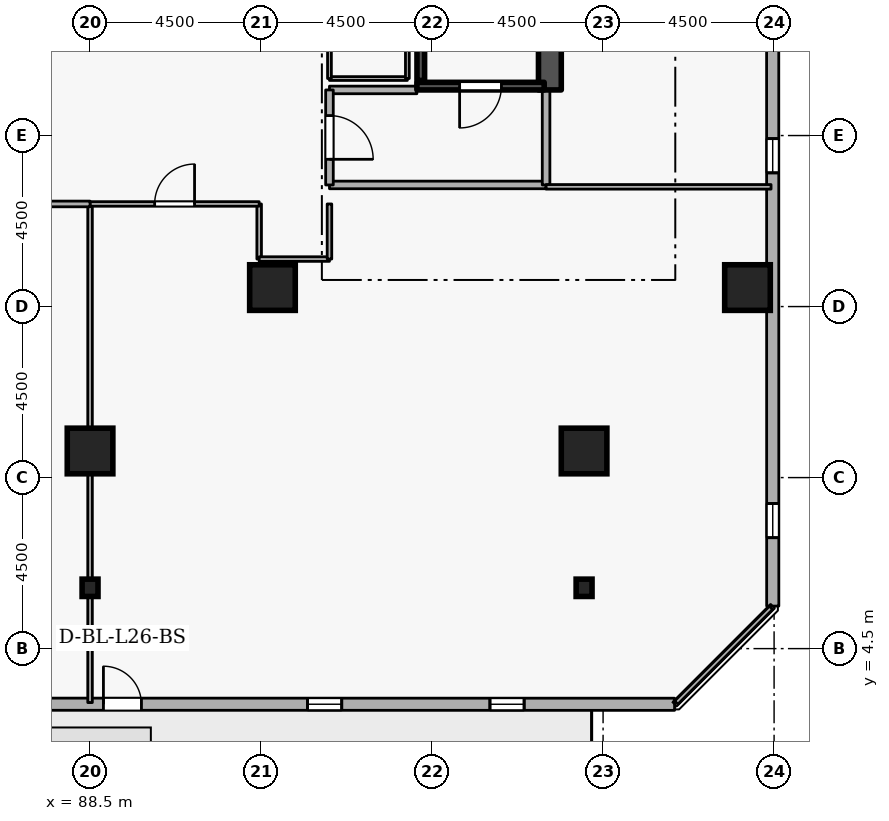
"""IFC4 building model, lengths in metres.
Left out: names, types, materials, properties, quantities, classifications, styles, units other than length and angle.
Written with IfcOpenShell. Run it as: python <this file> out.ifc"""

import sys

from ifc_helpers import new_model, si_unit, direction, frame, frame_2d, origin, origin_2d, place, context, subcontext, project, spatial, rectangle, i_section, extrude, element, fill, save


model = new_model("IFC4")
c1 = context("Model", 3, precision=1e-05, world=origin(), true_north=direction((0.0, 1.0)))
c2 = subcontext(c1, "Body", "Model", "MODEL_VIEW")
j1 = project(units=[si_unit("LENGTHUNIT", "METRE"), si_unit("PLANEANGLEUNIT", "RADIAN")], contexts=[c1])
p1 = place(None, origin())
s1 = spatial("IfcSite", under=j1, at=p1, CompositionType="ELEMENT")
p2 = place(p1, origin())
s2 = spatial("IfcBuilding", under=s1, at=p2, CompositionType="ELEMENT")
p3 = place(p2, frame((0.0, 0.0, 101.7)))
s3 = spatial("IfcBuildingStorey", under=s2, at=p3, CompositionType="ELEMENT", Elevation=101.7)
p4 = place(p3, frame((100.6, 19.2, 0.0), z_axis=(0.0, 0.0, 1.0), x_axis=(0.0, 1.0, 0.0)))
e1 = element("IfcWall", 1, at=p4, inside=s3, PredefinedType="SHEAR", context=c2, shape_type="SweptSolid", body=[
    extrude(rectangle(XDim=15.6, YDim=0.6, at=frame_2d((7.8, 0.0))), origin(), (0.0, 0.0, 1.0), 3.6),
])
for number, where, z_axis, x_axis in (
    (2, (105.8, 14.0, 0.0), (0.0, 0.0, 1.0), (1.0, 0.0, 0.0)),
    (3, (101.5, 9.7, 0.0), (0.0, 0.0, 1.0), (1.0, 0.0, 0.0)),
    (4, (88.5, 9.7, 0.0), (0.0, 0.0, 1.0), (1.0, 0.0, 0.0)),
    (5, (93.3, 14.0, 0.0), (0.0, 0.0, 1.0), (1.0, 0.0, 0.0)),
):
    element("IfcColumn", number, at=place(p3, frame(where, z_axis=z_axis, x_axis=x_axis)), inside=s3, PredefinedType="COLUMN", context=c2, shape_type="SweptSolid", body=[
        extrude(rectangle(XDim=1.2, YDim=1.2, at=origin_2d()), origin(), (0.0, 0.0, 1.0), 3.6),
    ])
for number, where, z_axis, x_axis in (
    (6, (101.5, 6.1, 0.0), (0.0, 0.0, 1.0), (1.0, 0.0, 0.0)),
    (7, (88.5, 6.1, 0.0), (0.0, 0.0, 1.0), (1.0, 0.0, 0.0)),
):
    element("IfcColumn", number, at=place(p3, frame(where, z_axis=z_axis, x_axis=x_axis)), inside=s3, PredefinedType="COLUMN", context=c2, shape_type="SweptSolid", body=[
        extrude(i_section(OverallWidth=0.418, OverallDepth=0.456, WebThickness=0.042, FlangeThickness=0.067, FilletRadius=0.015, at=origin_2d()), origin(), (0.0, 0.0, 1.0), 3.6),
    ])
p5 = place(p3, frame((68.423, 3.04, 0.0), z_axis=(0.0, 0.0, 1.0), x_axis=(0.99999999315, -0.00011704845, 0.0)))
e8 = element("IfcWall", 8, at=p5, inside=s3, PredefinedType="STANDARD", context=c2, shape_type="SweptSolid", body=[
    extrude(rectangle(XDim=35.459, YDim=0.32, at=frame_2d((17.729, 0.0))), origin(), (0.0, 0.0, 1.0), 2.7),
])
p6 = place(p5, frame((20.429, 0.0, 0.0)))
e9 = element("IfcOpeningElement", 9, at=p6, cuts=e8, PredefinedType="OPENING", context=c2, shape_type="SweptSolid", body=[
    extrude(rectangle(XDim=1.0, YDim=2.08, at=frame_2d((0.5, 1.04))), frame((0.0, 0.17, 0.0), z_axis=(0.0, -1.0, 0.0), x_axis=(1.0, 0.0, 0.0)), (0.0, 0.0, 1.0), 0.34),
])
p7 = place(p5, frame((1.8, 0.0, 0.72)))
e10 = element("IfcOpeningElement", 10, at=p7, cuts=e8, PredefinedType="OPENING", context=c2, shape_type="SweptSolid", body=[
    extrude(rectangle(XDim=0.9, YDim=1.75, at=frame_2d((0.45, 0.875))), frame((0.0, 0.17, 0.0), z_axis=(0.0, -1.0, 0.0), x_axis=(1.0, 0.0, 0.0)), (0.0, 0.0, 1.0), 0.34),
])
p8 = place(p5, frame((6.6, 0.0, 0.72)))
e11 = element("IfcOpeningElement", 11, at=p8, cuts=e8, PredefinedType="OPENING", context=c2, shape_type="SweptSolid", body=[
    extrude(rectangle(XDim=0.9, YDim=1.75, at=frame_2d((0.45, 0.875))), frame((0.0, 0.17, 0.0), z_axis=(0.0, -1.0, 0.0), x_axis=(1.0, 0.0, 0.0)), (0.0, 0.0, 1.0), 0.34),
])
p9 = place(p5, frame((11.4, 0.0, 0.72)))
e12 = element("IfcOpeningElement", 12, at=p9, cuts=e8, PredefinedType="OPENING", context=c2, shape_type="SweptSolid", body=[
    extrude(rectangle(XDim=0.9, YDim=1.75, at=frame_2d((0.45, 0.875))), frame((0.0, 0.17, 0.0), z_axis=(0.0, -1.0, 0.0), x_axis=(1.0, 0.0, 0.0)), (0.0, 0.0, 1.0), 0.34),
])
p10 = place(p5, frame((16.2, 0.0, 0.72)))
e13 = element("IfcOpeningElement", 13, at=p10, cuts=e8, PredefinedType="OPENING", context=c2, shape_type="SweptSolid", body=[
    extrude(rectangle(XDim=0.9, YDim=1.75, at=frame_2d((0.45, 0.875))), frame((0.0, 0.17, 0.0), z_axis=(0.0, -1.0, 0.0), x_axis=(1.0, 0.0, 0.0)), (0.0, 0.0, 1.0), 0.34),
])
p11 = place(p5, frame((25.8, 0.0, 0.72)))
e14 = element("IfcOpeningElement", 14, at=p11, cuts=e8, PredefinedType="OPENING", context=c2, shape_type="SweptSolid", body=[
    extrude(rectangle(XDim=0.9, YDim=1.75, at=frame_2d((0.45, 0.875))), frame((0.0, 0.17, 0.0), z_axis=(0.0, -1.0, 0.0), x_axis=(1.0, 0.0, 0.0)), (0.0, 0.0, 1.0), 0.34),
])
p12 = place(p5, frame((30.6, 0.0, 0.72)))
e15 = element("IfcOpeningElement", 15, at=p12, cuts=e8, PredefinedType="OPENING", context=c2, shape_type="SweptSolid", body=[
    extrude(rectangle(XDim=0.9, YDim=1.75, at=frame_2d((0.45, 0.875))), frame((0.0, 0.17, 0.0), z_axis=(0.0, -1.0, 0.0), x_axis=(1.0, 0.0, 0.0)), (0.0, 0.0, 1.0), 0.34),
])
p13 = place(p3, frame((106.465, 5.619, 0.0), z_axis=(0.0, 0.0, 1.0), x_axis=(-0.00011704845, 0.99999999315, 0.0)))
e16 = element("IfcWall", 16, at=p13, inside=s3, PredefinedType="STANDARD", context=c2, shape_type="SweptSolid", body=[
    extrude(rectangle(XDim=35.459, YDim=0.32, at=frame_2d((17.729, 0.0))), origin(), (0.0, 0.0, 1.0), 2.7),
])
p14 = place(p13, frame((1.8, 0.0, 0.72)))
e17 = element("IfcOpeningElement", 17, at=p14, cuts=e16, PredefinedType="OPENING", context=c2, shape_type="SweptSolid", body=[
    extrude(rectangle(XDim=0.9, YDim=1.75, at=frame_2d((0.45, 0.875))), frame((0.0, 0.17, 0.0), z_axis=(0.0, -1.0, 0.0), x_axis=(1.0, 0.0, 0.0)), (0.0, 0.0, 1.0), 0.34),
])
p15 = place(p13, frame((11.4, 0.0, 0.72)))
e18 = element("IfcOpeningElement", 18, at=p15, cuts=e16, PredefinedType="OPENING", context=c2, shape_type="SweptSolid", body=[
    extrude(rectangle(XDim=0.9, YDim=1.75, at=frame_2d((0.45, 0.875))), frame((0.0, 0.17, 0.0), z_axis=(0.0, -1.0, 0.0), x_axis=(1.0, 0.0, 0.0)), (0.0, 0.0, 1.0), 0.34),
])
p16 = place(p13, frame((16.2, 0.0, 0.72)))
e19 = element("IfcOpeningElement", 19, at=p16, cuts=e16, PredefinedType="OPENING", context=c2, shape_type="SweptSolid", body=[
    extrude(rectangle(XDim=0.9, YDim=1.75, at=frame_2d((0.45, 0.875))), frame((0.0, 0.17, 0.0), z_axis=(0.0, -1.0, 0.0), x_axis=(1.0, 0.0, 0.0)), (0.0, 0.0, 1.0), 0.34),
])
p17 = place(p13, frame((25.8, 0.0, 0.72)))
e20 = element("IfcOpeningElement", 20, at=p17, cuts=e16, PredefinedType="OPENING", context=c2, shape_type="SweptSolid", body=[
    extrude(rectangle(XDim=0.9, YDim=1.75, at=frame_2d((0.45, 0.875))), frame((0.0, 0.17, 0.0), z_axis=(0.0, -1.0, 0.0), x_axis=(1.0, 0.0, 0.0)), (0.0, 0.0, 1.0), 0.34),
])
p18 = place(p13, frame((30.6, 0.0, 0.72)))
e21 = element("IfcOpeningElement", 21, at=p18, cuts=e16, PredefinedType="OPENING", context=c2, shape_type="SweptSolid", body=[
    extrude(rectangle(XDim=0.9, YDim=1.75, at=frame_2d((0.45, 0.875))), frame((0.0, 0.17, 0.0), z_axis=(0.0, -1.0, 0.0), x_axis=(1.0, 0.0, 0.0)), (0.0, 0.0, 1.0), 0.34),
])
p19 = place(p3, frame((100.45, 19.3, 0.0), z_axis=(0.0, 0.0, 1.0), x_axis=(-1.0, 0.0, 0.0)))
e22 = element("IfcWall", 22, at=p19, inside=s3, PredefinedType="SHEAR", context=c2, shape_type="SweptSolid", body=[
    extrude(rectangle(XDim=3.35, YDim=0.2, at=frame_2d((1.675, 0.0))), origin(), (0.0, 0.0, 1.0), 3.6),
])
p20 = place(p19, frame((1.125, 0.0, 0.0)))
e23 = element("IfcOpeningElement", 23, at=p20, cuts=e22, PredefinedType="OPENING", context=c2, shape_type="SweptSolid", body=[
    extrude(rectangle(XDim=1.1, YDim=2.1, at=frame_2d((0.55, 1.05))), frame((0.0, 0.11, 0.0), z_axis=(0.0, -1.0, 0.0), x_axis=(1.0, 0.0, 0.0)), (0.0, 0.0, 1.0), 0.22),
])
p21 = place(p3, frame((97.203, 26.55, 0.0), z_axis=(0.0, 0.0, 1.0), x_axis=(0.0, -1.0, 0.0)))
e24 = element("IfcWall", 24, at=p21, inside=s3, PredefinedType="SHEAR", context=c2, shape_type="SweptSolid", body=[
    extrude(rectangle(XDim=7.1, YDim=0.2, at=frame_2d((3.55, 0.0))), origin(), (0.0, 0.0, 1.0), 3.6),
])
p22 = place(p3, frame((94.8, 16.7, 0.0), z_axis=(0.0, 0.0, 1.0), x_axis=(1.0, 0.0, 0.0)))
e25 = element("IfcWall", 25, at=p22, inside=s3, PredefinedType="STANDARD", context=c2, shape_type="SweptSolid", body=[
    extrude(rectangle(XDim=5.7, YDim=0.2, at=frame_2d((2.85, 0.0))), origin(), (0.0, 0.0, 1.0), 3.34),
])
p23 = place(p3, frame((100.5, 16.7, 0.0), z_axis=(0.0, 0.0, 1.0), x_axis=(0.0, 1.0, 0.0)))
e26 = element("IfcWall", 26, at=p23, inside=s3, PredefinedType="STANDARD", context=c2, shape_type="SweptSolid", body=[
    extrude(rectangle(XDim=2.5, YDim=0.2, at=frame_2d((1.25, 0.0))), origin(), (0.0, 0.0, 1.0), 3.34),
])
p24 = place(p3, frame((97.1, 19.2, 0.0), z_axis=(0.0, 0.0, 1.0), x_axis=(-1.0, 0.0, 0.0)))
e27 = element("IfcWall", 27, at=p24, inside=s3, PredefinedType="STANDARD", context=c2, shape_type="SweptSolid", body=[
    extrude(rectangle(XDim=2.3, YDim=0.2, at=frame_2d((1.15, 0.0))), origin(), (0.0, 0.0, 1.0), 2.545),
])
p25 = place(p3, frame((94.8, 19.2, 0.0), z_axis=(0.0, 0.0, 1.0), x_axis=(0.0, -1.0, 0.0)))
e28 = element("IfcWall", 28, at=p25, inside=s3, PredefinedType="STANDARD", context=c2, shape_type="SweptSolid", body=[
    extrude(rectangle(XDim=2.5, YDim=0.2, at=frame_2d((1.25, 0.0))), origin(), (0.0, 0.0, 1.0), 3.34),
])
p26 = place(p25, frame((0.675, 0.0, 0.0)))
e29 = element("IfcOpeningElement", 29, at=p26, cuts=e28, PredefinedType="OPENING", context=c2, shape_type="SweptSolid", body=[
    extrude(rectangle(XDim=1.15, YDim=2.1, at=frame_2d((0.575, 1.05))), frame((0.0, 0.11, 0.0), z_axis=(0.0, -1.0, 0.0), x_axis=(1.0, 0.0, 0.0)), (0.0, 0.0, 1.0), 0.22),
])
p27 = place(p3, frame((94.8, 19.5, 0.0), z_axis=(0.0, 0.0, 1.0), x_axis=(1.0, 0.0, 0.0)))
e30 = element("IfcWall", 30, at=p27, inside=s3, PredefinedType="PARTITIONING", context=c2, shape_type="SweptSolid", body=[
    extrude(rectangle(XDim=2.05, YDim=0.1, at=frame_2d((1.025, 0.0))), origin(), (0.0, 0.0, 1.0), 2.545),
])
p28 = place(p3, frame((96.85, 19.5, 0.0), z_axis=(0.0, 0.0, 1.0), x_axis=(0.0, 1.0, 0.0)))
e31 = element("IfcWall", 31, at=p28, inside=s3, PredefinedType="PARTITIONING", context=c2, shape_type="SweptSolid", body=[
    extrude(rectangle(XDim=2.6, YDim=0.1, at=frame_2d((1.3, 0.0))), origin(), (0.0, 0.0, 1.0), 3.34),
])
p29 = place(p3, frame((94.8, 22.1, 0.0), z_axis=(0.0, 0.0, 1.0), x_axis=(0.0, -1.0, 0.0)))
e32 = element("IfcWall", 32, at=p29, inside=s3, PredefinedType="PARTITIONING", context=c2, shape_type="SweptSolid", body=[
    extrude(rectangle(XDim=2.6, YDim=0.1, at=frame_2d((1.3, 0.0))), origin(), (0.0, 0.0, 1.0), 3.34),
])
p30 = place(p29, frame((0.825, 0.0, 0.0)))
e33 = element("IfcOpeningElement", 33, at=p30, cuts=e32, PredefinedType="OPENING", context=c2, shape_type="SweptSolid", body=[
    extrude(rectangle(XDim=0.95, YDim=2.1, at=frame_2d((0.475, 1.05))), frame((0.0, 0.06, 0.0), z_axis=(0.0, -1.0, 0.0), x_axis=(1.0, 0.0, 0.0)), (0.0, 0.0, 1.0), 0.12),
])
p31 = place(p3, frame((92.95, 16.2, 0.0), z_axis=(0.0, 0.0, 1.0), x_axis=(0.0, -1.0, 0.0)))
e34 = element("IfcWall", 34, at=p31, inside=s3, PredefinedType="PARTITIONING", context=c2, shape_type="SweptSolid", body=[
    extrude(rectangle(XDim=1.45, YDim=0.12, at=frame_2d((0.725, 0.0))), origin(), (0.0, 0.0, 1.0), 3.34),
])
p32 = place(p3, frame((92.95, 14.75, 0.0), z_axis=(0.0, 0.0, 1.0), x_axis=(1.0, 0.0, 0.0)))
e35 = element("IfcWall", 35, at=p32, inside=s3, PredefinedType="PARTITIONING", context=c2, shape_type="SweptSolid", body=[
    extrude(rectangle(XDim=1.85, YDim=0.12, at=frame_2d((0.925, 0.0))), origin(), (0.0, 0.0, 1.0), 3.34),
])
p33 = place(p3, frame((94.8, 14.75, 0.0), z_axis=(0.0, 0.0, 1.0), x_axis=(0.0, 1.0, 0.0)))
e36 = element("IfcWall", 36, at=p33, inside=s3, PredefinedType="PARTITIONING", context=c2, shape_type="SweptSolid", body=[
    extrude(rectangle(XDim=1.45, YDim=0.12, at=frame_2d((0.725, 0.0))), origin(), (0.0, 0.0, 1.0), 3.34),
])
p34 = place(p3, frame((100.5, 16.65, 0.0), z_axis=(0.0, 0.0, 1.0), x_axis=(1.0, 0.0, 0.0)))
e37 = element("IfcWall", 37, at=p34, inside=s3, PredefinedType="PARTITIONING", context=c2, shape_type="SweptSolid", body=[
    extrude(rectangle(XDim=5.92, YDim=0.12, at=frame_2d((2.96, 0.0))), origin(), (0.0, 0.0, 1.0), 3.34),
])
p35 = place(p3, frame((106.42, 5.575, 0.0), z_axis=(0.0, 0.0, 1.0), x_axis=(-0.707106781187, -0.707106781187, 0.0)))
e38 = element("IfcWall", 38, at=p35, inside=s3, PredefinedType="PARTITIONING", context=c2, shape_type="SweptSolid", body=[
    extrude(rectangle(XDim=3.528, YDim=0.12, at=frame_2d((1.764, 0.0))), origin(), (0.0, 0.0, 1.0), 3.34),
])
p36 = place(p3, frame((88.5, 3.08, 0.0), z_axis=(0.0, 0.0, 1.0), x_axis=(0.0, 1.0, 0.0)))
e39 = element("IfcWall", 39, at=p36, inside=s3, PredefinedType="PARTITIONING", context=c2, shape_type="SweptSolid", body=[
    extrude(rectangle(XDim=13.12, YDim=0.12, at=frame_2d((6.56, 0.0))), origin(), (0.0, 0.0, 1.0), 2.878),
])
p37 = place(p3, frame((88.5, 16.2, 0.0), z_axis=(0.0, 0.0, 1.0), x_axis=(1.0, 0.0, 0.0)))
e40 = element("IfcWall", 40, at=p37, inside=s3, PredefinedType="PARTITIONING", context=c2, shape_type="SweptSolid", body=[
    extrude(rectangle(XDim=4.45, YDim=0.12, at=frame_2d((2.225, 0.0))), origin(), (0.0, 0.0, 1.0), 3.34),
])
p38 = place(p37, frame((1.7, 0.0, 0.0)))
e41 = element("IfcOpeningElement", 41, at=p38, cuts=e40, PredefinedType="OPENING", context=c2, shape_type="SweptSolid", body=[
    extrude(rectangle(XDim=1.05, YDim=2.1, at=frame_2d((0.525, 1.05))), frame((0.0, 0.07, 0.0), z_axis=(0.0, -1.0, 0.0), x_axis=(1.0, 0.0, 0.0)), (0.0, 0.0, 1.0), 0.14),
])
p39 = place(p3, frame((84.05, 16.2, 0.0), z_axis=(0.0, 0.0, 1.0), x_axis=(1.0, 0.0, 0.0)))
e42 = element("IfcWall", 42, at=p39, inside=s3, PredefinedType="PARTITIONING", context=c2, shape_type="SweptSolid", body=[
    extrude(rectangle(XDim=4.45, YDim=0.15, at=frame_2d((2.225, 0.0))), origin(), (0.0, 0.0, 1.0), 3.34),
])
p40 = place(p39, frame((1.575, 0.0, 0.0)))
e43 = element("IfcOpeningElement", 43, at=p40, cuts=e42, PredefinedType="OPENING", context=c2, shape_type="SweptSolid", body=[
    extrude(rectangle(XDim=1.3, YDim=2.12, at=frame_2d((0.65, 1.06))), frame((0.0, 0.085, 0.0), z_axis=(0.0, -1.0, 0.0), x_axis=(1.0, 0.0, 0.0)), (0.0, 0.0, 1.0), 0.17),
])
p41 = place(p6, origin())
e44 = element("IfcDoor", 44, at=p41, inside=s3, OperationType="SINGLE_SWING_LEFT", PredefinedType="DOOR", context=c2, shape_type="SweptSolid", body=[
    extrude(rectangle(XDim=1.0, YDim=2.08, at=frame_2d((0.5, 1.04))), frame((0.0, 0.025, 0.0), z_axis=(0.0, -1.0, 0.0), x_axis=(1.0, 0.0, 0.0)), (0.0, 0.0, 1.0), 0.05),
])
fill(e9, e44)
p42 = place(p11, origin())
e45 = element("IfcWindow", 45, at=p42, inside=s3, PartitioningType="SINGLE_PANEL", PredefinedType="WINDOW", context=c2, shape_type="SweptSolid", body=[
    extrude(rectangle(XDim=0.9, YDim=1.75, at=frame_2d((0.45, 0.875))), frame((0.0, 0.03, 0.0), z_axis=(0.0, -1.0, 0.0), x_axis=(1.0, 0.0, 0.0)), (0.0, 0.0, 1.0), 0.06),
])
fill(e14, e45)
p43 = place(p12, origin())
e46 = element("IfcWindow", 46, at=p43, inside=s3, PartitioningType="SINGLE_PANEL", PredefinedType="WINDOW", context=c2, shape_type="SweptSolid", body=[
    extrude(rectangle(XDim=0.9, YDim=1.75, at=frame_2d((0.45, 0.875))), frame((0.0, 0.03, 0.0), z_axis=(0.0, -1.0, 0.0), x_axis=(1.0, 0.0, 0.0)), (0.0, 0.0, 1.0), 0.06),
])
fill(e15, e46)
p44 = place(p14, origin())
e47 = element("IfcWindow", 47, at=p44, inside=s3, PartitioningType="SINGLE_PANEL", PredefinedType="WINDOW", context=c2, shape_type="SweptSolid", body=[
    extrude(rectangle(XDim=0.9, YDim=1.75, at=frame_2d((0.45, 0.875))), frame((0.0, 0.03, 0.0), z_axis=(0.0, -1.0, 0.0), x_axis=(1.0, 0.0, 0.0)), (0.0, 0.0, 1.0), 0.06),
])
fill(e17, e47)
p45 = place(p15, origin())
e48 = element("IfcWindow", 48, at=p45, inside=s3, PartitioningType="SINGLE_PANEL", PredefinedType="WINDOW", context=c2, shape_type="SweptSolid", body=[
    extrude(rectangle(XDim=0.9, YDim=1.75, at=frame_2d((0.45, 0.875))), frame((0.0, 0.03, 0.0), z_axis=(0.0, -1.0, 0.0), x_axis=(1.0, 0.0, 0.0)), (0.0, 0.0, 1.0), 0.06),
])
fill(e18, e48)
p46 = place(p20, origin())
e49 = element("IfcDoor", 49, at=p46, inside=s3, OperationType="SINGLE_SWING_RIGHT", PredefinedType="DOOR", context=c2, shape_type="SweptSolid", body=[
    extrude(rectangle(XDim=1.1, YDim=2.1, at=frame_2d((0.55, 1.05))), frame((0.0, 0.025, 0.0), z_axis=(0.0, -1.0, 0.0), x_axis=(1.0, 0.0, 0.0)), (0.0, 0.0, 1.0), 0.05),
])
fill(e23, e49)
p47 = place(p26, origin())
e50 = element("IfcDoor", 50, at=p47, inside=s3, OperationType="SINGLE_SWING_RIGHT", PredefinedType="DOOR", context=c2, shape_type="SweptSolid", body=[
    extrude(rectangle(XDim=1.15, YDim=2.1, at=frame_2d((0.575, 1.05))), frame((0.0, 0.025, 0.0), z_axis=(0.0, -1.0, 0.0), x_axis=(1.0, 0.0, 0.0)), (0.0, 0.0, 1.0), 0.05),
])
fill(e29, e50)
p48 = place(p38, origin())
e51 = element("IfcDoor", 51, at=p48, inside=s3, OperationType="SINGLE_SWING_RIGHT", PredefinedType="DOOR", context=c2, shape_type="SweptSolid", body=[
    extrude(rectangle(XDim=1.05, YDim=2.1, at=frame_2d((0.525, 1.05))), frame((0.0, 0.025, 0.0), z_axis=(0.0, -1.0, 0.0), x_axis=(1.0, 0.0, 0.0)), (0.0, 0.0, 1.0), 0.05),
])
fill(e41, e51)
save(model, sys.argv[1])
